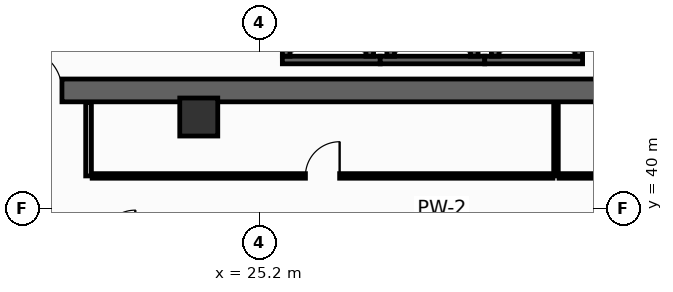
"""IFC4 building model, lengths in metres.
Left out: names, types, materials, properties, quantities, classifications, styles, units other than length and angle.
Written with IfcOpenShell. Run it as: python <this file> out.ifc"""

import sys

from ifc_helpers import new_model, si_unit, direction, frame, frame_2d, origin, origin_2d, place, context, subcontext, project, spatial, rectangle, hollow_rectangle, extrude, element, fill, save


model = new_model("IFC4")
c1 = context("Model", 3, precision=1e-05, world=origin(), true_north=direction((0.0, 1.0)))
c2 = subcontext(c1, "Body", "Model", "MODEL_VIEW")
j1 = project(units=[si_unit("LENGTHUNIT", "METRE"), si_unit("PLANEANGLEUNIT", "RADIAN")], contexts=[c1])
p1 = place(None, origin())
s1 = spatial("IfcSite", under=j1, at=p1, CompositionType="ELEMENT")
p2 = place(p1, origin())
s2 = spatial("IfcBuilding", under=s1, at=p2, CompositionType="ELEMENT")
p3 = place(p2, frame((0.0, 0.0, 114.8)))
s3 = spatial("IfcBuildingStorey", under=s2, at=p3, CompositionType="ELEMENT", Elevation=114.8)
p4 = place(p3, frame((13.5, 43.1, 0.0), z_axis=(0.0, 0.0, 1.0), x_axis=(1.0, 0.0, 0.0)))
e1 = element("IfcWall", 1, at=p4, inside=s3, PredefinedType="SHEAR", context=c2, shape_type="SweptSolid", body=[
    extrude(rectangle(XDim=32.9, YDim=0.6, at=frame_2d((16.45, 0.0))), origin(), (0.0, 0.0, 1.0), 4.15),
])
p5 = place(p4, frame((5.4, 0.0, 0.0)))
e2 = element("IfcOpeningElement", 2, at=p5, cuts=e1, PredefinedType="OPENING", context=c2, shape_type="SweptSolid", body=[
    extrude(rectangle(XDim=1.1, YDim=2.15, at=frame_2d((0.55, 1.075))), frame((0.0, 0.31, 0.0), z_axis=(0.0, -1.0, 0.0), x_axis=(1.0, 0.0, 0.0)), (0.0, 0.0, 1.0), 0.62),
])
p6 = place(p4, frame((25.6, 0.0, 0.0)))
e3 = element("IfcOpeningElement", 3, at=p6, cuts=e1, PredefinedType="OPENING", context=c2, shape_type="SweptSolid", body=[
    extrude(rectangle(XDim=1.1, YDim=2.15, at=frame_2d((0.55, 1.075))), frame((0.0, 0.31, 0.0), z_axis=(0.0, -1.0, 0.0), x_axis=(1.0, 0.0, 0.0)), (0.0, 0.0, 1.0), 0.62),
])
p7 = place(p3, frame((23.6, 42.4, 0.0), z_axis=(0.0, 0.0, 1.0), x_axis=(1.0, 0.0, 0.0)))
e4 = element("IfcColumn", 4, at=p7, inside=s3, PredefinedType="COLUMN", context=c2, shape_type="SweptSolid", body=[
    extrude(hollow_rectangle(XDim=1.0, YDim=1.0, WallThickness=0.045, at=origin_2d()), origin(), (0.0, 0.0, 1.0), 4.4),
])
p8 = place(p3, frame((25.8, 43.9, 0.0), z_axis=(0.0, 0.0, 1.0), x_axis=(1.0, 0.0, 0.0)))
e5 = element("IfcWall", 5, at=p8, inside=s3, PredefinedType="SHEAR", context=c2, shape_type="SweptSolid", body=[
    extrude(rectangle(XDim=2.575, YDim=0.2, at=frame_2d((1.288, 0.0))), origin(), (0.0, 0.0, 1.0), 4.15),
])
for number, where, z_axis, x_axis in (
    (6, (25.9, 44.0, 0.0), (0.0, 0.0, 1.0), (0.0, 1.0, 0.0)),
    (7, (28.1, 44.0, 0.0), (0.0, 0.0, 1.0), (0.0, 1.0, 0.0)),
):
    element("IfcWall", number, at=place(p3, frame(where, z_axis=z_axis, x_axis=x_axis)), inside=s3, PredefinedType="SHEAR", context=c2, shape_type="SweptSolid", body=[
        extrude(rectangle(XDim=2.3, YDim=0.2, at=frame_2d((1.15, 0.0))), origin(), (0.0, 0.0, 1.0), 4.15),
    ])
p9 = place(p3, frame((28.375, 43.9, 0.0), z_axis=(0.0, 0.0, 1.0), x_axis=(1.0, 0.0, 0.0)))
e8 = element("IfcWall", 8, at=p9, inside=s3, PredefinedType="SHEAR", context=c2, shape_type="SweptSolid", body=[
    extrude(rectangle(XDim=2.75, YDim=0.2, at=frame_2d((1.375, 0.0))), origin(), (0.0, 0.0, 1.0), 4.15),
])
for number, where, z_axis, x_axis in (
    (9, (28.65, 44.0, 0.0), (0.0, 0.0, 1.0), (0.0, 1.0, 0.0)),
    (10, (30.85, 44.0, 0.0), (0.0, 0.0, 1.0), (0.0, 1.0, 0.0)),
):
    element("IfcWall", number, at=place(p3, frame(where, z_axis=z_axis, x_axis=x_axis)), inside=s3, PredefinedType="SHEAR", context=c2, shape_type="SweptSolid", body=[
        extrude(rectangle(XDim=2.3, YDim=0.2, at=frame_2d((1.15, 0.0))), origin(), (0.0, 0.0, 1.0), 4.15),
    ])
p10 = place(p3, frame((31.125, 43.9, 0.0), z_axis=(0.0, 0.0, 1.0), x_axis=(1.0, 0.0, 0.0)))
e11 = element("IfcWall", 11, at=p10, inside=s3, PredefinedType="SHEAR", context=c2, shape_type="SweptSolid", body=[
    extrude(rectangle(XDim=2.575, YDim=0.2, at=frame_2d((1.288, 0.0))), origin(), (0.0, 0.0, 1.0), 4.15),
])
for number, where, z_axis, x_axis in (
    (12, (31.4, 44.0, 0.0), (0.0, 0.0, 1.0), (0.0, 1.0, 0.0)),
    (13, (33.6, 44.0, 0.0), (0.0, 0.0, 1.0), (0.0, 1.0, 0.0)),
):
    element("IfcWall", number, at=place(p3, frame(where, z_axis=z_axis, x_axis=x_axis)), inside=s3, PredefinedType="SHEAR", context=c2, shape_type="SweptSolid", body=[
        extrude(rectangle(XDim=2.3, YDim=0.2, at=frame_2d((1.15, 0.0))), origin(), (0.0, 0.0, 1.0), 4.15),
    ])
p11 = place(p3, frame((20.7, 40.85, 0.0), z_axis=(0.0, 0.0, 1.0), x_axis=(0.0, 1.0, 0.0)))
e14 = element("IfcWall", 14, at=p11, inside=s3, PredefinedType="PARTITIONING", context=c2, shape_type="SweptSolid", body=[
    extrude(rectangle(XDim=1.93, YDim=0.15, at=frame_2d((0.965, 0.0))), origin(), (0.0, 0.0, 1.0), 4.15),
])
p12 = place(p3, frame((33.0, 40.85, 0.0), z_axis=(0.0, 0.0, 1.0), x_axis=(0.0, 1.0, 0.0)))
e15 = element("IfcWall", 15, at=p12, inside=s3, PredefinedType="PARTITIONING", context=c2, shape_type="SweptSolid", body=[
    extrude(rectangle(XDim=1.93, YDim=0.12, at=frame_2d((0.965, 0.0))), origin(), (0.0, 0.0, 1.0), 3.335),
])
p13 = place(p3, frame((20.795, 40.85, 0.0), z_axis=(0.0, 0.0, 1.0), x_axis=(1.0, 0.0, 0.0)))
e16 = element("IfcWall", 16, at=p13, inside=s3, PredefinedType="PARTITIONING", context=c2, shape_type="SweptSolid", body=[
    extrude(rectangle(XDim=12.125, YDim=0.12, at=frame_2d((6.062, 0.0))), origin(), (0.0, 0.0, 1.0), 3.335),
])
p14 = place(p13, frame((5.612, 0.0, 0.0)))
e17 = element("IfcOpeningElement", 17, at=p14, cuts=e16, PredefinedType="OPENING", context=c2, shape_type="SweptSolid", body=[
    extrude(rectangle(XDim=0.9, YDim=2.1, at=frame_2d((0.45, 1.05))), frame((0.0, 0.07, 0.0), z_axis=(0.0, -1.0, 0.0), x_axis=(1.0, 0.0, 0.0)), (0.0, 0.0, 1.0), 0.14),
])
p15 = place(p3, frame((33.08, 40.85, 0.0), z_axis=(0.0, 0.0, 1.0), x_axis=(1.0, 0.0, 0.0)))
e18 = element("IfcWall", 18, at=p15, inside=s3, PredefinedType="PARTITIONING", context=c2, shape_type="SweptSolid", body=[
    extrude(rectangle(XDim=5.625, YDim=0.12, at=frame_2d((2.812, 0.0))), origin(), (0.0, 0.0, 1.0), 3.335),
])
p16 = place(p15, frame((1.702, 0.0, 0.0)))
e19 = element("IfcOpeningElement", 19, at=p16, cuts=e18, PredefinedType="OPENING", context=c2, shape_type="SweptSolid", body=[
    extrude(rectangle(XDim=0.9, YDim=2.1, at=frame_2d((0.45, 1.05))), frame((0.0, 0.07, 0.0), z_axis=(0.0, -1.0, 0.0), x_axis=(1.0, 0.0, 0.0)), (0.0, 0.0, 1.0), 0.14),
])
p17 = place(p5, origin())
e20 = element("IfcDoor", 20, at=p17, inside=s3, OperationType="SINGLE_SWING_LEFT", PredefinedType="DOOR", context=c2, shape_type="SweptSolid", body=[
    extrude(rectangle(XDim=1.1, YDim=2.15, at=frame_2d((0.55, 1.075))), frame((0.0, 0.025, 0.0), z_axis=(0.0, -1.0, 0.0), x_axis=(1.0, 0.0, 0.0)), (0.0, 0.0, 1.0), 0.05),
])
fill(e2, e20)
p18 = place(p14, origin())
e21 = element("IfcDoor", 21, at=p18, inside=s3, OperationType="SINGLE_SWING_RIGHT", PredefinedType="DOOR", context=c2, shape_type="SweptSolid", body=[
    extrude(rectangle(XDim=0.9, YDim=2.1, at=frame_2d((0.45, 1.05))), frame((0.0, 0.025, 0.0), z_axis=(0.0, -1.0, 0.0), x_axis=(1.0, 0.0, 0.0)), (0.0, 0.0, 1.0), 0.05),
])
fill(e17, e21)
save(model, sys.argv[1])
